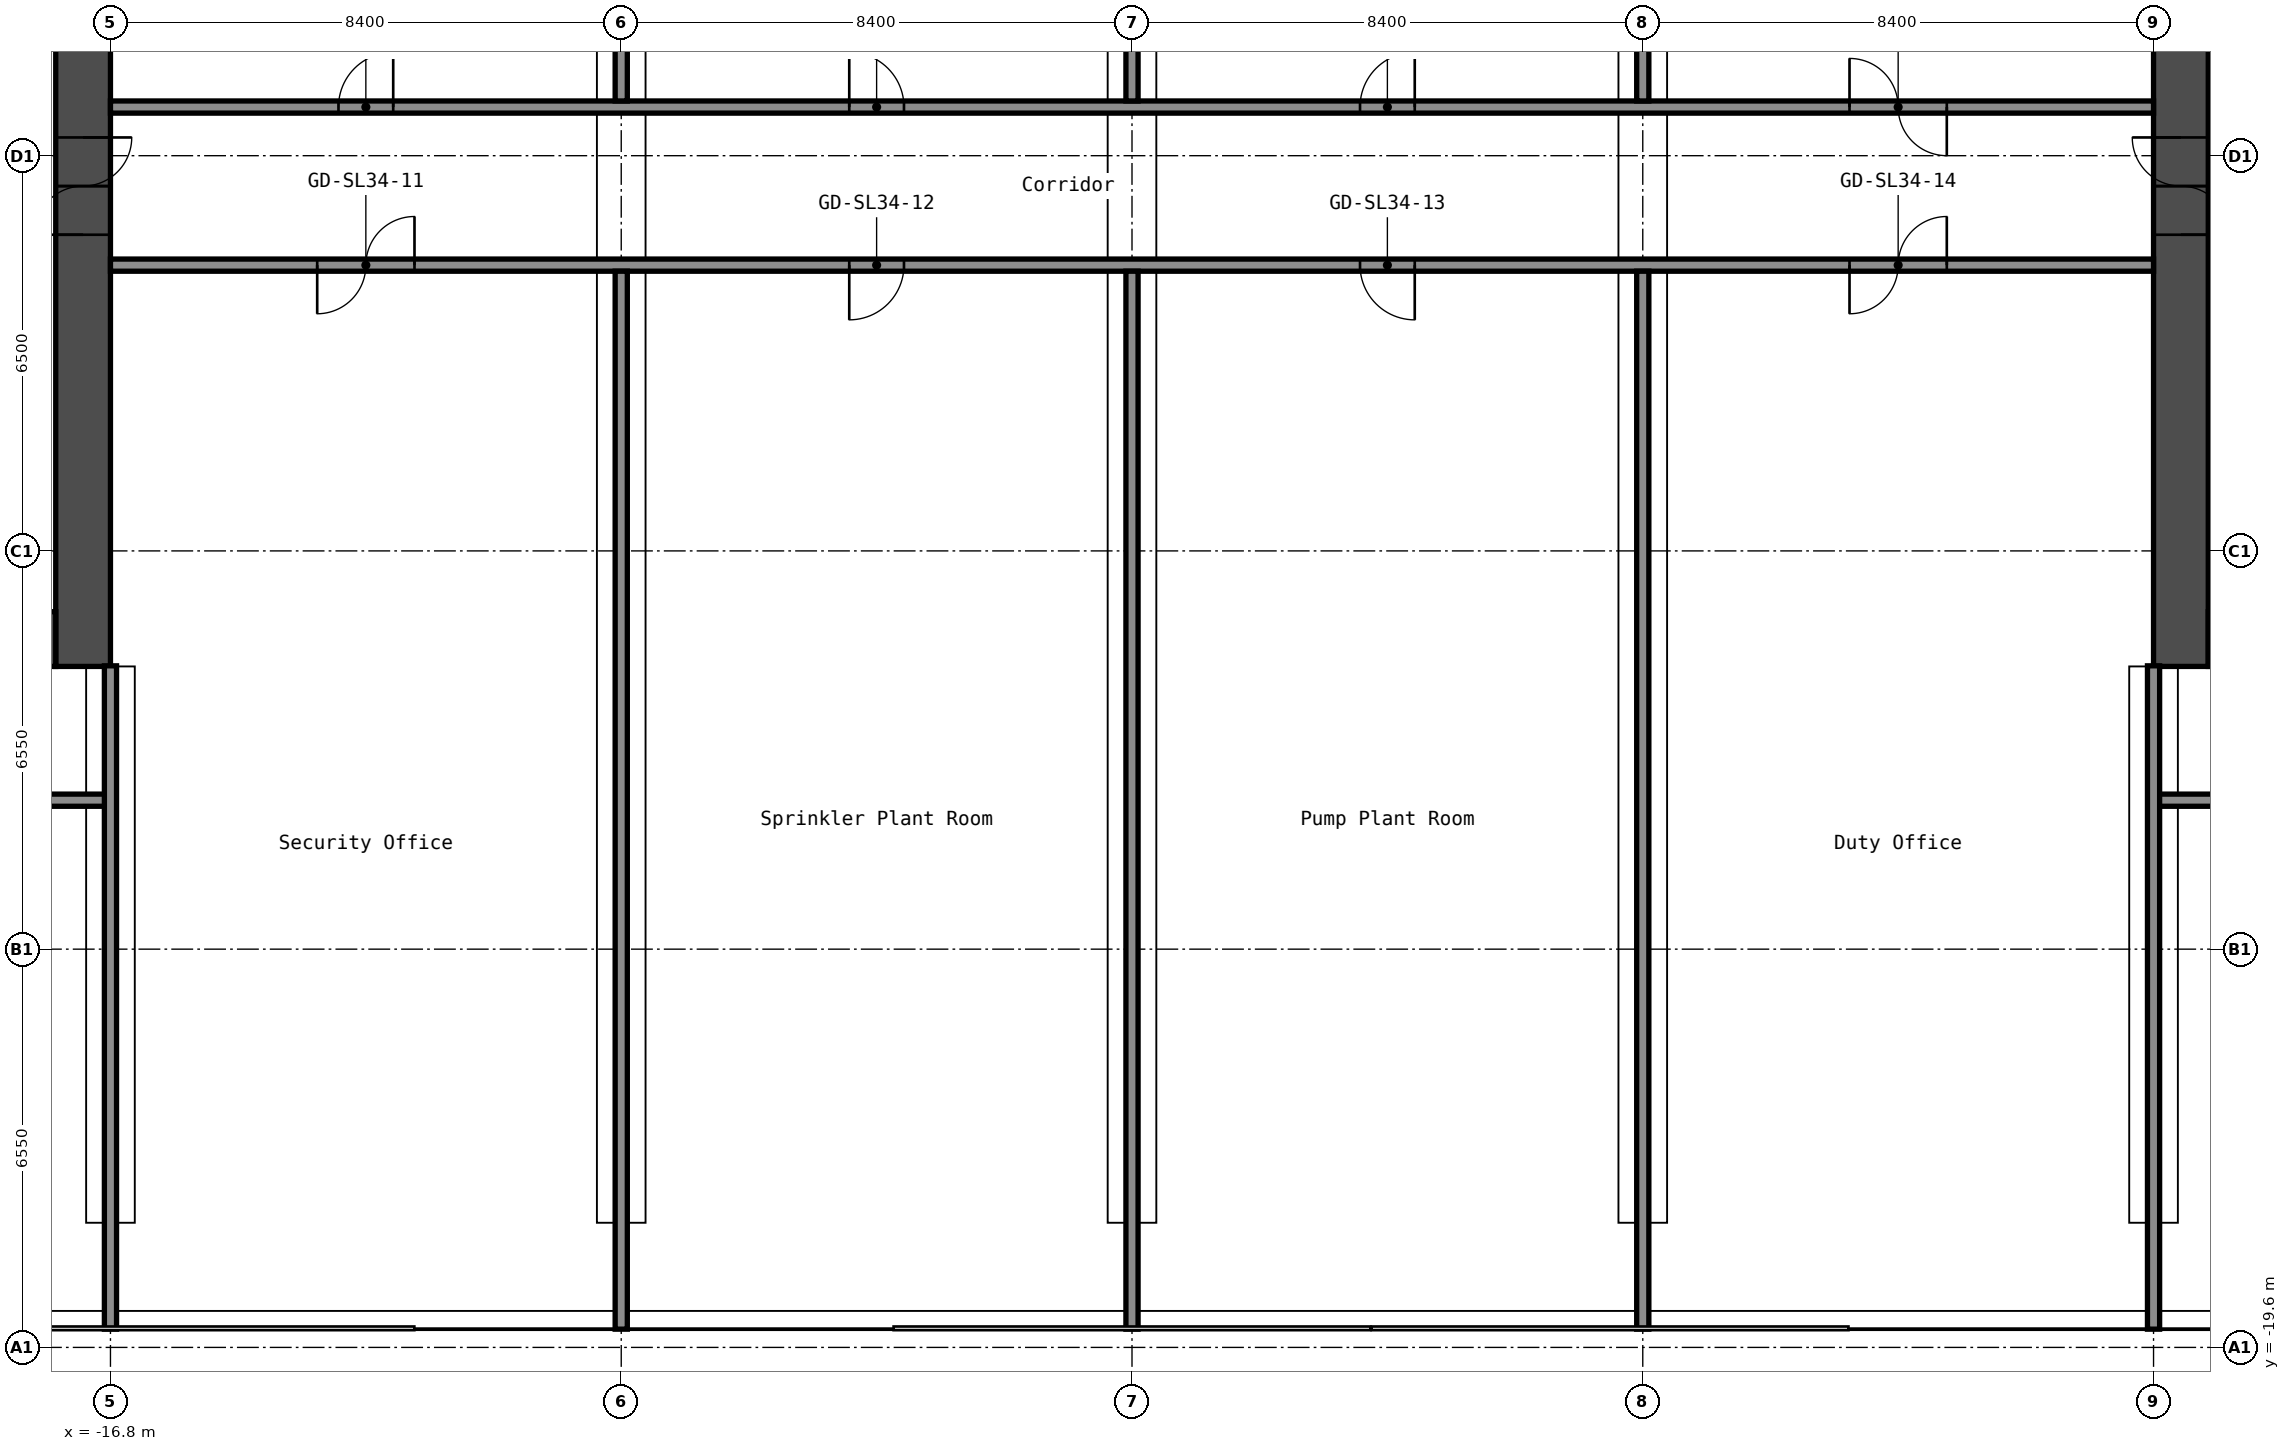
"""IFC4 building model, lengths in metres.
Left out: names, types, materials, properties, quantities, classifications, styles, units other than length and angle.
Written with IfcOpenShell. Run it as: python <this file> out.ifc"""

import sys

from ifc_helpers import new_model, si_unit, direction, frame, frame_2d, origin, place, context, subcontext, project, spatial, rectangle, extrude, element, fill, save


model = new_model("IFC4")
c1 = context("Model", 3, precision=1e-05, world=origin(), true_north=direction((0.0, 1.0)))
c2 = subcontext(c1, "Body", "Model", "MODEL_VIEW")
j1 = project(units=[si_unit("LENGTHUNIT", "METRE"), si_unit("PLANEANGLEUNIT", "RADIAN")], contexts=[c1])
p1 = place(None, origin())
s1 = spatial("IfcSite", under=j1, at=p1, CompositionType="ELEMENT")
p2 = place(p1, origin())
s2 = spatial("IfcBuilding", under=s1, at=p2, CompositionType="ELEMENT")
p3 = place(p2, frame((0.0, 0.0, 120.2)))
s3 = spatial("IfcBuildingStorey", under=s2, at=p3, CompositionType="ELEMENT", Elevation=120.2)
p4 = place(p3, frame((-17.25, -8.4, 0.0), z_axis=(0.0, 0.0, 1.0), x_axis=(0.0, 1.0, 0.0)))
e1 = element("IfcWall", 1, at=p4, inside=s3, PredefinedType="SHEAR", context=c2, shape_type="SweptSolid", body=[
    extrude(rectangle(XDim=16.8, YDim=0.9, at=frame_2d((8.4, 0.0))), origin(), (0.0, 0.0, 1.0), 4.1),
])
p5 = place(p4, frame((7.1, 0.0, 0.0)))
e2 = element("IfcOpeningElement", 2, at=p5, cuts=e1, PredefinedType="OPENING", context=c2, shape_type="SweptSolid", body=[
    extrude(rectangle(XDim=1.6, YDim=2.1, at=frame_2d((0.8, 1.05))), frame((0.0, 0.46, 0.0), z_axis=(0.0, -1.0, 0.0), x_axis=(1.0, 0.0, 0.0)), (0.0, 0.0, 1.0), 0.92),
])
p6 = place(p3, frame((-32.7, -7.95, 0.0), z_axis=(0.0, 0.0, 1.0), x_axis=(1.0, 0.0, 0.0)))
e3 = element("IfcWall", 3, at=p6, inside=s3, PredefinedType="SHEAR", context=c2, shape_type="SweptSolid", body=[
    extrude(rectangle(XDim=15.0, YDim=0.9, at=frame_2d((7.5, 0.0))), origin(), (0.0, 0.0, 1.0), 4.1),
])
p7 = place(p6, frame((11.45, 0.0, 0.0)))
e4 = element("IfcOpeningElement", 4, at=p7, cuts=e3, PredefinedType="OPENING", context=c2, shape_type="SweptSolid", body=[
    extrude(rectangle(XDim=1.0, YDim=2.1, at=frame_2d((0.5, 1.05))), frame((0.0, 0.46, 0.0), z_axis=(0.0, -1.0, 0.0), x_axis=(1.0, 0.0, 0.0)), (0.0, 0.0, 1.0), 0.92),
])
p8 = place(p3, frame((17.25, -8.4, 0.0), z_axis=(0.0, 0.0, 1.0), x_axis=(0.0, 1.0, 0.0)))
e5 = element("IfcWall", 5, at=p8, inside=s3, PredefinedType="SHEAR", context=c2, shape_type="SweptSolid", body=[
    extrude(rectangle(XDim=16.8, YDim=0.9, at=frame_2d((8.4, 0.0))), origin(), (0.0, 0.0, 1.0), 4.1),
])
p9 = place(p8, frame((7.1, 0.0, 0.0)))
e6 = element("IfcOpeningElement", 6, at=p9, cuts=e5, PredefinedType="OPENING", context=c2, shape_type="SweptSolid", body=[
    extrude(rectangle(XDim=1.6, YDim=2.1, at=frame_2d((0.8, 1.05))), frame((0.0, 0.46, 0.0), z_axis=(0.0, -1.0, 0.0), x_axis=(1.0, 0.0, 0.0)), (0.0, 0.0, 1.0), 0.92),
])
p10 = place(p3, frame((17.7, -7.95, 0.0), z_axis=(0.0, 0.0, 1.0), x_axis=(1.0, 0.0, 0.0)))
e7 = element("IfcWall", 7, at=p10, inside=s3, PredefinedType="SHEAR", context=c2, shape_type="SweptSolid", body=[
    extrude(rectangle(XDim=15.0, YDim=0.9, at=frame_2d((7.5, 0.0))), origin(), (0.0, 0.0, 1.0), 4.1),
])
p11 = place(p10, frame((2.55, 0.0, 0.0)))
e8 = element("IfcOpeningElement", 8, at=p11, cuts=e7, PredefinedType="OPENING", context=c2, shape_type="SweptSolid", body=[
    extrude(rectangle(XDim=1.0, YDim=2.1, at=frame_2d((0.5, 1.05))), frame((0.0, 0.46, 0.0), z_axis=(0.0, -1.0, 0.0), x_axis=(1.0, 0.0, 0.0)), (0.0, 0.0, 1.0), 0.92),
])
p12 = place(p3, frame((-46.5, -10.6, 0.0), z_axis=(0.0, 0.0, 1.0), x_axis=(1.0, 0.0, 0.0)))
e9 = element("IfcWall", 9, at=p12, inside=s3, PredefinedType="PARTITIONING", context=c2, shape_type="SweptSolid", body=[
    extrude(rectangle(XDim=29.7, YDim=0.2, at=frame_2d((14.85, 0.0))), origin(), (0.0, 0.0, 1.0), 4.1),
])
p13 = place(p12, frame((1.95, 0.0, 0.0)))
e10 = element("IfcOpeningElement", 10, at=p13, cuts=e9, PredefinedType="OPENING", context=c2, shape_type="SweptSolid", body=[
    extrude(rectangle(XDim=0.9, YDim=2.1, at=frame_2d((0.45, 1.05))), frame((0.0, 0.11, 0.0), z_axis=(0.0, -1.0, 0.0), x_axis=(1.0, 0.0, 0.0)), (0.0, 0.0, 1.0), 0.22),
])
p14 = place(p12, frame((8.25, 0.0, 0.0)))
e11 = element("IfcOpeningElement", 11, at=p14, cuts=e9, PredefinedType="OPENING", context=c2, shape_type="SweptSolid", body=[
    extrude(rectangle(XDim=0.9, YDim=2.1, at=frame_2d((0.45, 1.05))), frame((0.0, 0.11, 0.0), z_axis=(0.0, -1.0, 0.0), x_axis=(1.0, 0.0, 0.0)), (0.0, 0.0, 1.0), 0.22),
])
p15 = place(p12, frame((16.65, 0.0, 0.0)))
e12 = element("IfcOpeningElement", 12, at=p15, cuts=e9, PredefinedType="OPENING", context=c2, shape_type="SweptSolid", body=[
    extrude(rectangle(XDim=0.9, YDim=2.1, at=frame_2d((0.45, 1.05))), frame((0.0, 0.11, 0.0), z_axis=(0.0, -1.0, 0.0), x_axis=(1.0, 0.0, 0.0)), (0.0, 0.0, 1.0), 0.22),
])
p16 = place(p12, frame((25.05, 0.0, 0.0)))
e13 = element("IfcOpeningElement", 13, at=p16, cuts=e9, PredefinedType="OPENING", context=c2, shape_type="SweptSolid", body=[
    extrude(rectangle(XDim=0.9, YDim=2.1, at=frame_2d((0.45, 1.05))), frame((0.0, 0.11, 0.0), z_axis=(0.0, -1.0, 0.0), x_axis=(1.0, 0.0, 0.0)), (0.0, 0.0, 1.0), 0.22),
])
p17 = place(p3, frame((16.8, -10.6, 0.0), z_axis=(0.0, 0.0, 1.0), x_axis=(1.0, 0.0, 0.0)))
e14 = element("IfcWall", 14, at=p17, inside=s3, PredefinedType="PARTITIONING", context=c2, shape_type="SweptSolid", body=[
    extrude(rectangle(XDim=29.7, YDim=0.2, at=frame_2d((14.85, 0.0))), origin(), (0.0, 0.0, 1.0), 4.1),
])
p18 = place(p17, frame((3.4, 0.0, 0.0)))
e15 = element("IfcOpeningElement", 15, at=p18, cuts=e14, PredefinedType="OPENING", context=c2, shape_type="SweptSolid", body=[
    extrude(rectangle(XDim=1.6, YDim=2.1, at=frame_2d((0.8, 1.05))), frame((0.0, 0.11, 0.0), z_axis=(0.0, -1.0, 0.0), x_axis=(1.0, 0.0, 0.0)), (0.0, 0.0, 1.0), 0.22),
])
p19 = place(p17, frame((12.15, 0.0, 0.0)))
e16 = element("IfcOpeningElement", 16, at=p19, cuts=e14, PredefinedType="OPENING", context=c2, shape_type="SweptSolid", body=[
    extrude(rectangle(XDim=0.9, YDim=2.1, at=frame_2d((0.45, 1.05))), frame((0.0, 0.11, 0.0), z_axis=(0.0, -1.0, 0.0), x_axis=(1.0, 0.0, 0.0)), (0.0, 0.0, 1.0), 0.22),
])
p20 = place(p17, frame((20.55, 0.0, 0.0)))
e17 = element("IfcOpeningElement", 17, at=p20, cuts=e14, PredefinedType="OPENING", context=c2, shape_type="SweptSolid", body=[
    extrude(rectangle(XDim=0.9, YDim=2.1, at=frame_2d((0.45, 1.05))), frame((0.0, 0.11, 0.0), z_axis=(0.0, -1.0, 0.0), x_axis=(1.0, 0.0, 0.0)), (0.0, 0.0, 1.0), 0.22),
])
p21 = place(p17, frame((26.85, 0.0, 0.0)))
e18 = element("IfcOpeningElement", 18, at=p21, cuts=e14, PredefinedType="OPENING", context=c2, shape_type="SweptSolid", body=[
    extrude(rectangle(XDim=0.9, YDim=2.1, at=frame_2d((0.45, 1.05))), frame((0.0, 0.11, 0.0), z_axis=(0.0, -1.0, 0.0), x_axis=(1.0, 0.0, 0.0)), (0.0, 0.0, 1.0), 0.22),
])
p22 = place(p3, frame((-16.8, -1.8, 0.0), z_axis=(0.0, 0.0, 1.0), x_axis=(1.0, 0.0, 0.0)))
e19 = element("IfcWall", 19, at=p22, inside=s3, PredefinedType="PARTITIONING", context=c2, shape_type="SweptSolid", body=[
    extrude(rectangle(XDim=33.6, YDim=0.2, at=frame_2d((16.8, 0.0))), origin(), (0.0, 0.0, 1.0), 4.1),
])
p23 = place(p22, frame((3.4, 0.0, 0.0)))
e20 = element("IfcOpeningElement", 20, at=p23, cuts=e19, PredefinedType="OPENING", context=c2, shape_type="SweptSolid", body=[
    extrude(rectangle(XDim=1.6, YDim=2.1, at=frame_2d((0.8, 1.05))), frame((0.0, 0.11, 0.0), z_axis=(0.0, -1.0, 0.0), x_axis=(1.0, 0.0, 0.0)), (0.0, 0.0, 1.0), 0.22),
])
p24 = place(p22, frame((12.15, 0.0, 0.0)))
e21 = element("IfcOpeningElement", 21, at=p24, cuts=e19, PredefinedType="OPENING", context=c2, shape_type="SweptSolid", body=[
    extrude(rectangle(XDim=0.9, YDim=2.1, at=frame_2d((0.45, 1.05))), frame((0.0, 0.11, 0.0), z_axis=(0.0, -1.0, 0.0), x_axis=(1.0, 0.0, 0.0)), (0.0, 0.0, 1.0), 0.22),
])
p25 = place(p22, frame((20.55, 0.0, 0.0)))
e22 = element("IfcOpeningElement", 22, at=p25, cuts=e19, PredefinedType="OPENING", context=c2, shape_type="SweptSolid", body=[
    extrude(rectangle(XDim=0.9, YDim=2.1, at=frame_2d((0.45, 1.05))), frame((0.0, 0.11, 0.0), z_axis=(0.0, -1.0, 0.0), x_axis=(1.0, 0.0, 0.0)), (0.0, 0.0, 1.0), 0.22),
])
p26 = place(p22, frame((28.6, 0.0, 0.0)))
e23 = element("IfcOpeningElement", 23, at=p26, cuts=e19, PredefinedType="OPENING", context=c2, shape_type="SweptSolid", body=[
    extrude(rectangle(XDim=1.6, YDim=2.1, at=frame_2d((0.8, 1.05))), frame((0.0, 0.11, 0.0), z_axis=(0.0, -1.0, 0.0), x_axis=(1.0, 0.0, 0.0)), (0.0, 0.0, 1.0), 0.22),
])
p27 = place(p3, frame((-16.8, 0.8, 0.0), z_axis=(0.0, 0.0, 1.0), x_axis=(1.0, 0.0, 0.0)))
e24 = element("IfcWall", 24, at=p27, inside=s3, PredefinedType="PARTITIONING", context=c2, shape_type="SweptSolid", body=[
    extrude(rectangle(XDim=33.6, YDim=0.2, at=frame_2d((16.8, 0.0))), origin(), (0.0, 0.0, 1.0), 4.1),
])
p28 = place(p27, frame((3.75, 0.0, 0.0)))
e25 = element("IfcOpeningElement", 25, at=p28, cuts=e24, PredefinedType="OPENING", context=c2, shape_type="SweptSolid", body=[
    extrude(rectangle(XDim=0.9, YDim=2.1, at=frame_2d((0.45, 1.05))), frame((0.0, 0.11, 0.0), z_axis=(0.0, -1.0, 0.0), x_axis=(1.0, 0.0, 0.0)), (0.0, 0.0, 1.0), 0.22),
])
p29 = place(p27, frame((12.15, 0.0, 0.0)))
e26 = element("IfcOpeningElement", 26, at=p29, cuts=e24, PredefinedType="OPENING", context=c2, shape_type="SweptSolid", body=[
    extrude(rectangle(XDim=0.9, YDim=2.1, at=frame_2d((0.45, 1.05))), frame((0.0, 0.11, 0.0), z_axis=(0.0, -1.0, 0.0), x_axis=(1.0, 0.0, 0.0)), (0.0, 0.0, 1.0), 0.22),
])
p30 = place(p27, frame((20.55, 0.0, 0.0)))
e27 = element("IfcOpeningElement", 27, at=p30, cuts=e24, PredefinedType="OPENING", context=c2, shape_type="SweptSolid", body=[
    extrude(rectangle(XDim=0.9, YDim=2.1, at=frame_2d((0.45, 1.05))), frame((0.0, 0.11, 0.0), z_axis=(0.0, -1.0, 0.0), x_axis=(1.0, 0.0, 0.0)), (0.0, 0.0, 1.0), 0.22),
])
p31 = place(p27, frame((28.6, 0.0, 0.0)))
e28 = element("IfcOpeningElement", 28, at=p31, cuts=e24, PredefinedType="OPENING", context=c2, shape_type="SweptSolid", body=[
    extrude(rectangle(XDim=1.6, YDim=2.1, at=frame_2d((0.8, 1.05))), frame((0.0, 0.11, 0.0), z_axis=(0.0, -1.0, 0.0), x_axis=(1.0, 0.0, 0.0)), (0.0, 0.0, 1.0), 0.22),
])
p32 = place(p3, frame((-16.8, -19.3, 0.0), z_axis=(0.0, 0.0, 1.0), x_axis=(0.0, 1.0, 0.0)))
e29 = element("IfcWall", 29, at=p32, inside=s3, PredefinedType="PARTITIONING", context=c2, shape_type="SweptSolid", body=[
    extrude(rectangle(XDim=10.91, YDim=0.2, at=frame_2d((5.455, 0.0))), origin(), (0.0, 0.0, 1.0), 4.1),
])
p33 = place(p3, frame((-8.4, -19.3, 0.0), z_axis=(0.0, 0.0, 1.0), x_axis=(0.0, 1.0, 0.0)))
e30 = element("IfcWall", 30, at=p33, inside=s3, PredefinedType="PARTITIONING", context=c2, shape_type="SweptSolid", body=[
    extrude(rectangle(XDim=17.4, YDim=0.2, at=frame_2d((8.7, 0.0))), origin(), (0.0, 0.0, 1.0), 4.1),
])
p34 = place(p3, frame((-8.4, 0.9, 0.0), z_axis=(0.0, 0.0, 1.0), x_axis=(0.0, 1.0, 0.0)))
e31 = element("IfcWall", 31, at=p34, inside=s3, PredefinedType="PARTITIONING", context=c2, shape_type="SweptSolid", body=[
    extrude(rectangle(XDim=22.65, YDim=0.2, at=frame_2d((11.325, 0.0))), origin(), (0.0, 0.0, 1.0), 4.1),
])
p35 = place(p3, frame((0.0, -19.3, 0.0), z_axis=(0.0, 0.0, 1.0), x_axis=(0.0, 1.0, 0.0)))
e32 = element("IfcWall", 32, at=p35, inside=s3, PredefinedType="PARTITIONING", context=c2, shape_type="SweptSolid", body=[
    extrude(rectangle(XDim=17.4, YDim=0.2, at=frame_2d((8.7, 0.0))), origin(), (0.0, 0.0, 1.0), 4.1),
])
p36 = place(p3, frame((0.0, 0.9, 0.0), z_axis=(0.0, 0.0, 1.0), x_axis=(0.0, 1.0, 0.0)))
e33 = element("IfcWall", 33, at=p36, inside=s3, PredefinedType="PARTITIONING", context=c2, shape_type="SweptSolid", body=[
    extrude(rectangle(XDim=22.65, YDim=0.2, at=frame_2d((11.325, 0.0))), origin(), (0.0, 0.0, 1.0), 4.1),
])
p37 = place(p3, frame((8.4, -19.3, 0.0), z_axis=(0.0, 0.0, 1.0), x_axis=(0.0, 1.0, 0.0)))
e34 = element("IfcWall", 34, at=p37, inside=s3, PredefinedType="PARTITIONING", context=c2, shape_type="SweptSolid", body=[
    extrude(rectangle(XDim=17.4, YDim=0.2, at=frame_2d((8.7, 0.0))), origin(), (0.0, 0.0, 1.0), 4.1),
])
p38 = place(p3, frame((8.4, 0.9, 0.0), z_axis=(0.0, 0.0, 1.0), x_axis=(0.0, 1.0, 0.0)))
e35 = element("IfcWall", 35, at=p38, inside=s3, PredefinedType="PARTITIONING", context=c2, shape_type="SweptSolid", body=[
    extrude(rectangle(XDim=22.65, YDim=0.2, at=frame_2d((11.325, 0.0))), origin(), (0.0, 0.0, 1.0), 4.1),
])
p39 = place(p3, frame((16.8, -19.3, 0.0), z_axis=(0.0, 0.0, 1.0), x_axis=(0.0, 1.0, 0.0)))
e36 = element("IfcWall", 36, at=p39, inside=s3, PredefinedType="PARTITIONING", context=c2, shape_type="SweptSolid", body=[
    extrude(rectangle(XDim=10.91, YDim=0.2, at=frame_2d((5.455, 0.0))), origin(), (0.0, 0.0, 1.0), 4.1),
])
p40 = place(p5, origin())
e37 = element("IfcDoor", 37, at=p40, inside=s3, OperationType="DOUBLE_DOOR_SINGLE_SWING", PredefinedType="DOOR", context=c2, shape_type="SweptSolid", body=[
    extrude(rectangle(XDim=1.6, YDim=2.1, at=frame_2d((0.8, 1.05))), frame((0.0, 0.025, 0.0), z_axis=(0.0, -1.0, 0.0), x_axis=(1.0, 0.0, 0.0)), (0.0, 0.0, 1.0), 0.05),
])
fill(e2, e37)
p41 = place(p9, origin())
e38 = element("IfcDoor", 38, at=p41, inside=s3, OperationType="DOUBLE_DOOR_SINGLE_SWING", PredefinedType="DOOR", context=c2, shape_type="SweptSolid", body=[
    extrude(rectangle(XDim=1.6, YDim=2.1, at=frame_2d((0.8, 1.05))), frame((0.0, 0.025, 0.0), z_axis=(0.0, -1.0, 0.0), x_axis=(1.0, 0.0, 0.0)), (0.0, 0.0, 1.0), 0.05),
])
fill(e6, e38)
p42 = place(p23, origin())
e39 = element("IfcDoor", 39, at=p42, inside=s3, OperationType="DOUBLE_DOOR_SINGLE_SWING", PredefinedType="DOOR", context=c2, shape_type="SweptSolid", body=[
    extrude(rectangle(XDim=1.6, YDim=2.1, at=frame_2d((0.8, 1.05))), frame((0.0, 0.025, 0.0), z_axis=(0.0, -1.0, 0.0), x_axis=(1.0, 0.0, 0.0)), (0.0, 0.0, 1.0), 0.05),
])
fill(e20, e39)
p43 = place(p24, origin())
e40 = element("IfcDoor", 40, at=p43, inside=s3, OperationType="SINGLE_SWING_LEFT", PredefinedType="DOOR", context=c2, shape_type="SweptSolid", body=[
    extrude(rectangle(XDim=0.9, YDim=2.1, at=frame_2d((0.45, 1.05))), frame((0.0, 0.025, 0.0), z_axis=(0.0, -1.0, 0.0), x_axis=(1.0, 0.0, 0.0)), (0.0, 0.0, 1.0), 0.05),
])
fill(e21, e40)
p44 = place(p25, origin())
e41 = element("IfcDoor", 41, at=p44, inside=s3, OperationType="SINGLE_SWING_RIGHT", PredefinedType="DOOR", context=c2, shape_type="SweptSolid", body=[
    extrude(rectangle(XDim=0.9, YDim=2.1, at=frame_2d((0.45, 1.05))), frame((0.0, 0.025, 0.0), z_axis=(0.0, -1.0, 0.0), x_axis=(1.0, 0.0, 0.0)), (0.0, 0.0, 1.0), 0.05),
])
fill(e22, e41)
p45 = place(p26, origin())
e42 = element("IfcDoor", 42, at=p45, inside=s3, OperationType="DOUBLE_DOOR_SINGLE_SWING", PredefinedType="DOOR", context=c2, shape_type="SweptSolid", body=[
    extrude(rectangle(XDim=1.6, YDim=2.1, at=frame_2d((0.8, 1.05))), frame((0.0, 0.025, 0.0), z_axis=(0.0, -1.0, 0.0), x_axis=(1.0, 0.0, 0.0)), (0.0, 0.0, 1.0), 0.05),
])
fill(e23, e42)
p46 = place(p28, origin())
e43 = element("IfcDoor", 43, at=p46, inside=s3, OperationType="SINGLE_SWING_LEFT", PredefinedType="DOOR", context=c2, shape_type="SweptSolid", body=[
    extrude(rectangle(XDim=0.9, YDim=2.1, at=frame_2d((0.45, 1.05))), frame((0.0, 0.025, 0.0), z_axis=(0.0, -1.0, 0.0), x_axis=(1.0, 0.0, 0.0)), (0.0, 0.0, 1.0), 0.05),
])
fill(e25, e43)
p47 = place(p29, origin())
e44 = element("IfcDoor", 44, at=p47, inside=s3, OperationType="SINGLE_SWING_RIGHT", PredefinedType="DOOR", context=c2, shape_type="SweptSolid", body=[
    extrude(rectangle(XDim=0.9, YDim=2.1, at=frame_2d((0.45, 1.05))), frame((0.0, 0.025, 0.0), z_axis=(0.0, -1.0, 0.0), x_axis=(1.0, 0.0, 0.0)), (0.0, 0.0, 1.0), 0.05),
])
fill(e26, e44)
p48 = place(p30, origin())
e45 = element("IfcDoor", 45, at=p48, inside=s3, OperationType="SINGLE_SWING_LEFT", PredefinedType="DOOR", context=c2, shape_type="SweptSolid", body=[
    extrude(rectangle(XDim=0.9, YDim=2.1, at=frame_2d((0.45, 1.05))), frame((0.0, 0.025, 0.0), z_axis=(0.0, -1.0, 0.0), x_axis=(1.0, 0.0, 0.0)), (0.0, 0.0, 1.0), 0.05),
])
fill(e27, e45)
p49 = place(p31, origin())
e46 = element("IfcDoor", 46, at=p49, inside=s3, OperationType="DOUBLE_DOOR_SINGLE_SWING", PredefinedType="DOOR", context=c2, shape_type="SweptSolid", body=[
    extrude(rectangle(XDim=1.6, YDim=2.1, at=frame_2d((0.8, 1.05))), frame((0.0, 0.025, 0.0), z_axis=(0.0, -1.0, 0.0), x_axis=(1.0, 0.0, 0.0)), (0.0, 0.0, 1.0), 0.05),
])
fill(e28, e46)
save(model, sys.argv[1])
